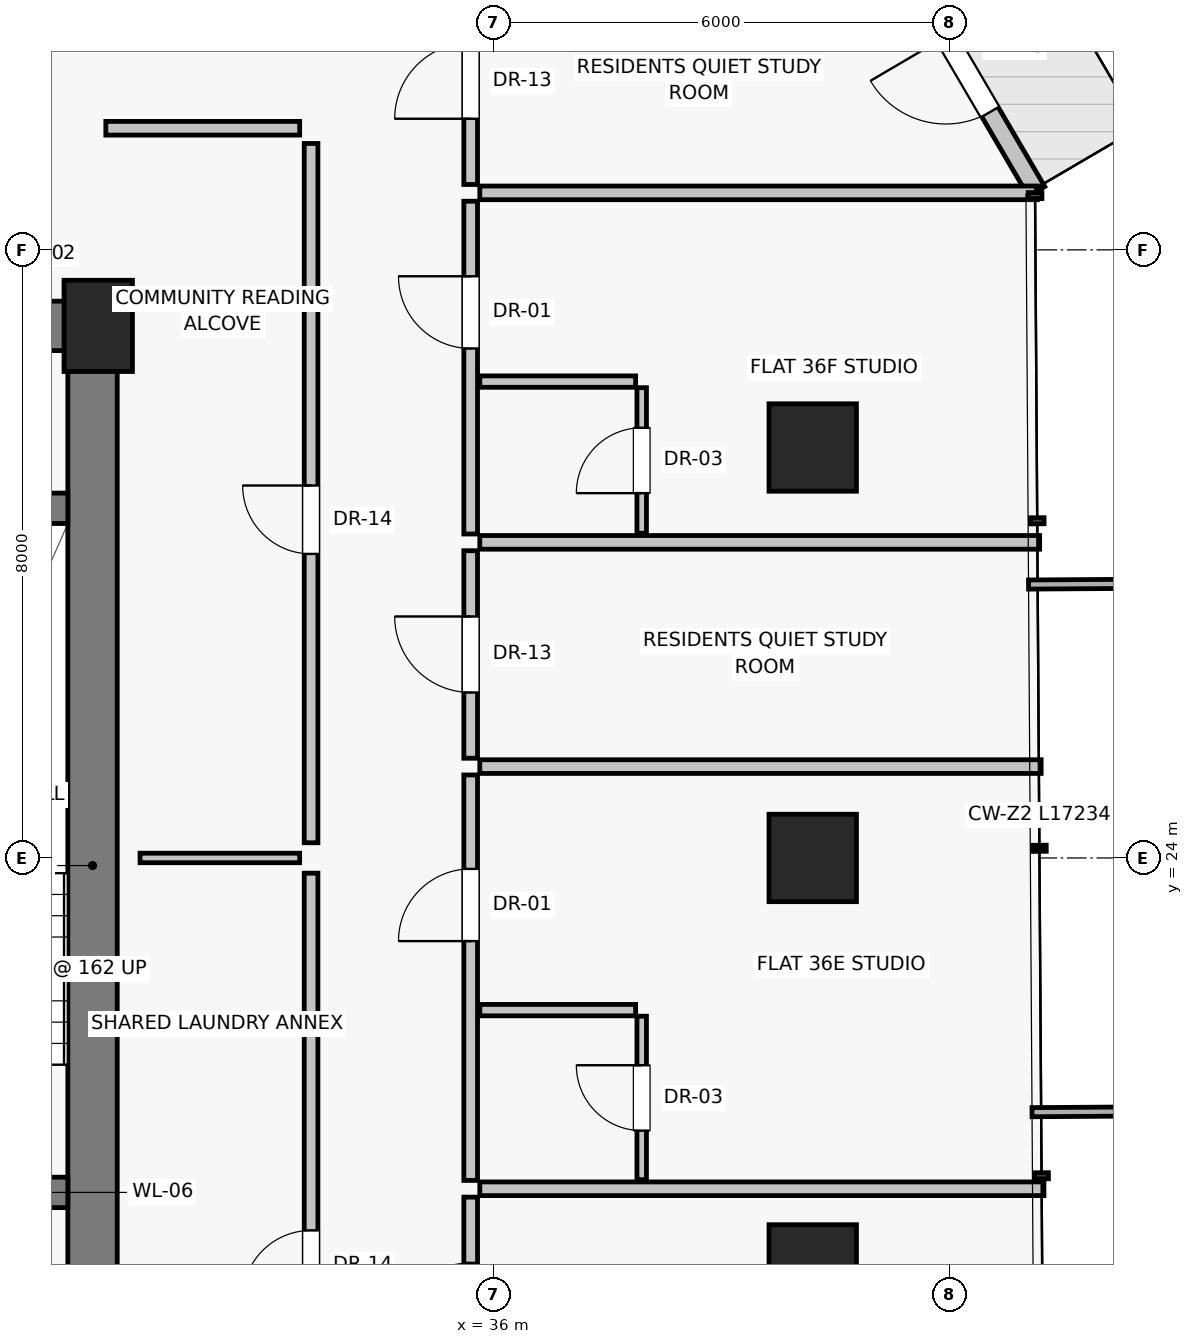
"""IFC4 building model, lengths in metres.
Left out: names, types, materials, properties, quantities, classifications, styles, units other than length and angle.
Written with IfcOpenShell. Run it as: python <this file> out.ifc"""

import sys

from ifc_helpers import new_model, si_unit, direction, frame, frame_2d, origin, origin_2d, place, context, subcontext, project, spatial, rectangle, extrude, source, transform, mapped, element, fill, save


model = new_model("IFC4")
c1 = context("Model", 3, precision=1e-05, world=origin(), true_north=direction((0.0, 1.0)))
c2 = subcontext(c1, "Body", "Model", "MODEL_VIEW")
j1 = project(units=[si_unit("LENGTHUNIT", "METRE"), si_unit("PLANEANGLEUNIT", "RADIAN")], contexts=[c1])
p1 = place(None, origin())
s1 = spatial("IfcSite", under=j1, at=p1, CompositionType="ELEMENT")
p2 = place(p1, origin())
s2 = spatial("IfcBuilding", under=s1, at=p2, CompositionType="ELEMENT")
p3 = place(p2, frame((0.0, 0.0, 129.5)))
s3 = spatial("IfcBuildingStorey", under=s2, at=p3, CompositionType="ELEMENT", Elevation=129.5)
p4 = place(p3, frame((30.8, 31.0, 0.0), z_axis=(0.0, 0.0, 1.0), x_axis=(1.0, 0.0, 0.0)))
e1 = element("IfcColumn", 1, at=p4, inside=s3, PredefinedType="PILASTER", context=c2, shape_type="SweptSolid", body=[
    extrude(rectangle(XDim=0.9, YDim=1.2, at=origin_2d()), origin(), (0.0, 0.0, 1.0), 3.25),
])
for number, where, z_axis, x_axis in (
    (2, (40.2, 18.6, 0.0), (0.0, 0.0, 1.0), (1.0, 0.0, 0.0)),
    (3, (40.2, 24.0, 0.0), (0.0, 0.0, 1.0), (1.0, 0.0, 0.0)),
    (4, (40.2, 29.4, 0.0), (0.0, 0.0, 1.0), (1.0, 0.0, 0.0)),
):
    element("IfcColumn", number, at=place(p3, frame(where, z_axis=z_axis, x_axis=x_axis)), inside=s3, PredefinedType="COLUMN", context=c2, shape_type="SweptSolid", body=[
        extrude(rectangle(XDim=1.15, YDim=1.15, at=origin_2d()), origin(), (0.0, 0.0, 1.0), 3.25),
    ])
p5 = place(p3, frame((43.145, 32.77, 0.0), z_axis=(0.0, 0.0, 1.0), x_axis=(-0.505741701413, 0.862684954924, 0.0)))
e5 = element("IfcWall", 5, at=p5, inside=s3, PredefinedType="SOLIDWALL", context=c2, shape_type="SweptSolid", body=[
    extrude(rectangle(XDim=4.233, YDim=0.25, at=frame_2d((2.117, 0.0))), origin(), (0.0, 0.0, 1.0), 3.0),
])
p6 = place(p5, frame((1.21, 0.0, 0.0)))
e6 = element("IfcOpeningElement", 6, at=p6, cuts=e5, PredefinedType="OPENING", context=c2, shape_type="SweptSolid", body=[
    extrude(rectangle(XDim=1.15, YDim=2.25, at=frame_2d((0.575, 1.125))), frame((0.0, 0.135, 0.0), z_axis=(0.0, -1.0, 0.0), x_axis=(1.0, 0.0, 0.0)), (0.0, 0.0, 1.0), 0.27),
])
p7 = place(p3, frame((30.725, 16.8, 0.0), z_axis=(0.0, 0.0, 1.0), x_axis=(0.0, 1.0, 0.0)))
e7 = element("IfcWall", 7, at=p7, inside=s3, PredefinedType="SHEAR", context=c2, shape_type="SweptSolid", body=[
    extrude(rectangle(XDim=14.2, YDim=0.65, at=frame_2d((7.1, 0.0))), origin(), (0.0, 0.0, 1.0), 3.0),
])
p8 = place(p3, frame((27.0, 31.0, 0.0), z_axis=(0.0, 0.0, 1.0), x_axis=(1.0, 0.0, 0.0)))
e8 = element("IfcWall", 8, at=p8, inside=s3, PredefinedType="SHEAR", context=c2, shape_type="SweptSolid", body=[
    extrude(rectangle(XDim=3.8, YDim=0.65, at=frame_2d((1.9, 0.0))), origin(), (0.0, 0.0, 1.0), 3.0),
])
p9 = place(p8, frame((1.15, 0.0, 0.0)))
e9 = element("IfcOpeningElement", 9, at=p9, cuts=e8, PredefinedType="OPENING", context=c2, shape_type="SweptSolid", body=[
    extrude(rectangle(XDim=1.0, YDim=2.01, at=frame_2d((0.5, 1.005))), frame((0.0, 0.335, 0.0), z_axis=(0.0, -1.0, 0.0), x_axis=(1.0, 0.0, 0.0)), (0.0, 0.0, 1.0), 0.67),
])
p10 = place(p3, frame((27.0, 19.6, 0.0), z_axis=(0.0, 0.0, 1.0), x_axis=(1.0, 0.0, 0.0)))
e10 = element("IfcWall", 10, at=p10, inside=s3, PredefinedType="SHEAR", context=c2, shape_type="SweptSolid", body=[
    extrude(rectangle(XDim=3.4, YDim=0.4, at=frame_2d((1.7, 0.0))), origin(), (0.0, 0.0, 1.0), 3.0),
])
p11 = place(p10, frame((1.05, 0.0, 0.0)))
e11 = element("IfcOpeningElement", 11, at=p11, cuts=e10, PredefinedType="OPENING", context=c2, shape_type="SweptSolid", body=[
    extrude(rectangle(XDim=1.1, YDim=2.03, at=frame_2d((0.55, 1.015))), frame((0.0, 0.21, 0.0), z_axis=(0.0, -1.0, 0.0), x_axis=(1.0, 0.0, 0.0)), (0.0, 0.0, 1.0), 0.42),
])
p12 = place(p3, frame((27.0, 28.6, 0.0), z_axis=(0.0, 0.0, 1.0), x_axis=(1.0, 0.0, 0.0)))
e12 = element("IfcWall", 12, at=p12, inside=s3, PredefinedType="SHEAR", context=c2, shape_type="SweptSolid", body=[
    extrude(rectangle(XDim=3.4, YDim=0.4, at=frame_2d((1.7, 0.0))), origin(), (0.0, 0.0, 1.0), 3.0),
])
p13 = place(p3, frame((33.6, 14.4, 0.0), z_axis=(0.0, 0.0, 1.0), x_axis=(0.0, 1.0, 0.0)))
e13 = element("IfcWall", 13, at=p13, inside=s3, PredefinedType="PARTITIONING", context=c2, shape_type="SweptSolid", body=[
    extrude(rectangle(XDim=9.4, YDim=0.18, at=frame_2d((4.7, 0.0))), origin(), (0.0, 0.0, 1.0), 3.0),
])
p14 = place(p13, frame((3.8, 0.0, 0.0)))
e14 = element("IfcOpeningElement", 14, at=p14, cuts=e13, PredefinedType="OPENING", context=c2, shape_type="SweptSolid", body=[
    extrude(rectangle(XDim=0.9, YDim=2.01, at=frame_2d((0.45, 1.005))), frame((0.0, 0.1, 0.0), z_axis=(0.0, -1.0, 0.0), x_axis=(1.0, 0.0, 0.0)), (0.0, 0.0, 1.0), 0.2),
])
p15 = place(p3, frame((33.6, 24.2, 0.0), z_axis=(0.0, 0.0, 1.0), x_axis=(0.0, 1.0, 0.0)))
e15 = element("IfcWall", 15, at=p15, inside=s3, PredefinedType="PARTITIONING", context=c2, shape_type="SweptSolid", body=[
    extrude(rectangle(XDim=9.2, YDim=0.18, at=frame_2d((4.6, 0.0))), origin(), (0.0, 0.0, 1.0), 3.0),
])
p16 = place(p15, frame((3.8, 0.0, 0.0)))
e16 = element("IfcOpeningElement", 16, at=p16, cuts=e15, PredefinedType="OPENING", context=c2, shape_type="SweptSolid", body=[
    extrude(rectangle(XDim=0.9, YDim=2.01, at=frame_2d((0.45, 1.005))), frame((0.0, 0.1, 0.0), z_axis=(0.0, -1.0, 0.0), x_axis=(1.0, 0.0, 0.0)), (0.0, 0.0, 1.0), 0.2),
])
p17 = place(p3, frame((31.35, 24.0, 0.0), z_axis=(0.0, 0.0, 1.0), x_axis=(1.0, 0.0, 0.0)))
e17 = element("IfcWall", 17, at=p17, inside=s3, PredefinedType="PARTITIONING", context=c2, shape_type="SweptSolid", body=[
    extrude(rectangle(XDim=2.1, YDim=0.125, at=frame_2d((1.05, 0.0))), origin(), (0.0, 0.0, 1.0), 3.0),
])
p18 = place(p3, frame((30.9, 33.6, 0.0), z_axis=(0.0, 0.0, 1.0), x_axis=(1.0, 0.0, 0.0)))
e18 = element("IfcWall", 18, at=p18, inside=s3, PredefinedType="PARTITIONING", context=c2, shape_type="SweptSolid", body=[
    extrude(rectangle(XDim=2.55, YDim=0.18, at=frame_2d((1.275, 0.0))), origin(), (0.0, 0.0, 1.0), 3.0),
])
p19 = place(p3, frame((35.7, 16.808, 0.0), z_axis=(0.0, 0.0, 1.0), x_axis=(0.0, 1.0, 0.0)))
e19 = element("IfcWall", 19, at=p19, inside=s3, PredefinedType="PARTITIONING", context=c2, shape_type="SweptSolid", body=[
    extrude(rectangle(XDim=2.73, YDim=0.18, at=frame_2d((1.365, 0.0))), origin(), (0.0, 0.0, 1.0), 2.58),
])
p20 = place(p19, frame((0.865, 0.0, 0.0)))
e20 = element("IfcOpeningElement", 20, at=p20, cuts=e19, PredefinedType="OPENING", context=c2, shape_type="SweptSolid", body=[
    extrude(rectangle(XDim=1.0, YDim=2.01, at=frame_2d((0.5, 1.005))), frame((0.0, 0.1, 0.0), z_axis=(0.0, -1.0, 0.0), x_axis=(1.0, 0.0, 0.0)), (0.0, 0.0, 1.0), 0.2),
])
p21 = place(p3, frame((35.82, 19.648, 0.0), z_axis=(0.0, 0.0, 1.0), x_axis=(1.0, 0.0, 0.0)))
e21 = element("IfcWall", 21, at=p21, inside=s3, PredefinedType="PARTITIONING", context=c2, shape_type="SweptSolid", body=[
    extrude(rectangle(XDim=7.422, YDim=0.18, at=frame_2d((3.711, 0.0))), origin(), (0.0, 0.0, 1.0), 3.0),
])
p22 = place(p3, frame((35.7, 25.312, 0.0), z_axis=(0.0, 0.0, 1.0), x_axis=(0.0, 1.0, 0.0)))
e22 = element("IfcWall", 22, at=p22, inside=s3, PredefinedType="PARTITIONING", context=c2, shape_type="SweptSolid", body=[
    extrude(rectangle(XDim=2.73, YDim=0.18, at=frame_2d((1.365, 0.0))), origin(), (0.0, 0.0, 1.0), 2.58),
])
p23 = place(p22, frame((0.865, 0.0, 0.0)))
e23 = element("IfcOpeningElement", 23, at=p23, cuts=e22, PredefinedType="OPENING", context=c2, shape_type="SweptSolid", body=[
    extrude(rectangle(XDim=1.0, YDim=2.01, at=frame_2d((0.5, 1.005))), frame((0.0, 0.1, 0.0), z_axis=(0.0, -1.0, 0.0), x_axis=(1.0, 0.0, 0.0)), (0.0, 0.0, 1.0), 0.2),
])
p24 = place(p3, frame((35.82, 25.202, 0.0), z_axis=(0.0, 0.0, 1.0), x_axis=(1.0, 0.0, 0.0)))
e24 = element("IfcWall", 24, at=p24, inside=s3, PredefinedType="PARTITIONING", context=c2, shape_type="SweptSolid", body=[
    extrude(rectangle(XDim=7.385, YDim=0.18, at=frame_2d((3.692, 0.0))), origin(), (0.0, 0.0, 1.0), 3.0),
])
p25 = place(p3, frame((35.7, 19.758, 0.0), z_axis=(0.0, 0.0, 1.0), x_axis=(0.0, 1.0, 0.0)))
e25 = element("IfcWall", 25, at=p25, inside=s3, PredefinedType="PARTITIONING", context=c2, shape_type="SweptSolid", body=[
    extrude(rectangle(XDim=5.334, YDim=0.18, at=frame_2d((2.667, 0.0))), origin(), (0.0, 0.0, 1.0), 2.58),
])
p26 = place(p25, frame((3.148, 0.0, 0.0)))
e26 = element("IfcOpeningElement", 26, at=p26, cuts=e25, PredefinedType="OPENING", context=c2, shape_type="SweptSolid", body=[
    extrude(rectangle(XDim=0.95, YDim=2.02, at=frame_2d((0.475, 1.01))), frame((0.0, 0.1, 0.0), z_axis=(0.0, -1.0, 0.0), x_axis=(1.0, 0.0, 0.0)), (0.0, 0.0, 1.0), 0.2),
])
p27 = place(p3, frame((35.82, 21.998, 0.0), z_axis=(0.0, 0.0, 1.0), x_axis=(1.0, 0.0, 0.0)))
e27 = element("IfcWall", 27, at=p27, inside=s3, PredefinedType="PARTITIONING", context=c2, shape_type="SweptSolid", body=[
    extrude(rectangle(XDim=2.05, YDim=0.15, at=frame_2d((1.025, 0.0))), origin(), (0.0, 0.0, 1.0), 3.0),
])
p28 = place(p3, frame((37.95, 19.768, 0.0), z_axis=(0.0, 0.0, 1.0), x_axis=(0.0, 1.0, 0.0)))
e28 = element("IfcWall", 28, at=p28, inside=s3, PredefinedType="PARTITIONING", context=c2, shape_type="SweptSolid", body=[
    extrude(rectangle(XDim=2.15, YDim=0.125, at=frame_2d((1.075, 0.0))), origin(), (0.0, 0.0, 1.0), 3.0),
])
p29 = place(p28, frame((0.645, 0.0, 0.0)))
e29 = element("IfcOpeningElement", 29, at=p29, cuts=e28, PredefinedType="OPENING", context=c2, shape_type="SweptSolid", body=[
    extrude(rectangle(XDim=0.86, YDim=2.01, at=frame_2d((0.43, 1.005))), frame((0.0, 0.073, 0.0), z_axis=(0.0, -1.0, 0.0), x_axis=(1.0, 0.0, 0.0)), (0.0, 0.0, 1.0), 0.145),
])
p30 = place(p3, frame((35.82, 28.152, 0.0), z_axis=(0.0, 0.0, 1.0), x_axis=(1.0, 0.0, 0.0)))
e30 = element("IfcWall", 30, at=p30, inside=s3, PredefinedType="PARTITIONING", context=c2, shape_type="SweptSolid", body=[
    extrude(rectangle(XDim=7.365, YDim=0.18, at=frame_2d((3.683, 0.0))), origin(), (0.0, 0.0, 1.0), 3.0),
])
p31 = place(p3, frame((35.7, 32.86, 0.0), z_axis=(0.0, 0.0, 1.0), x_axis=(0.0, 1.0, 0.0)))
e31 = element("IfcWall", 31, at=p31, inside=s3, PredefinedType="PARTITIONING", context=c2, shape_type="SweptSolid", body=[
    extrude(rectangle(XDim=2.73, YDim=0.18, at=frame_2d((1.365, 0.0))), origin(), (0.0, 0.0, 1.0), 3.0),
])
p32 = place(p31, frame((0.865, 0.0, 0.0)))
e32 = element("IfcOpeningElement", 32, at=p32, cuts=e31, PredefinedType="OPENING", context=c2, shape_type="SweptSolid", body=[
    extrude(rectangle(XDim=1.0, YDim=2.01, at=frame_2d((0.5, 1.005))), frame((0.0, 0.1, 0.0), z_axis=(0.0, -1.0, 0.0), x_axis=(1.0, 0.0, 0.0)), (0.0, 0.0, 1.0), 0.2),
])
p33 = place(p3, frame((35.82, 32.75, 0.0), z_axis=(0.0, 0.0, 1.0), x_axis=(1.0, 0.0, 0.0)))
e33 = element("IfcWall", 33, at=p33, inside=s3, PredefinedType="PARTITIONING", context=c2, shape_type="SweptSolid", body=[
    extrude(rectangle(XDim=7.335, YDim=0.18, at=frame_2d((3.667, 0.0))), origin(), (0.0, 0.0, 1.0), 3.0),
])
p34 = place(p3, frame((35.7, 28.262, 0.0), z_axis=(0.0, 0.0, 1.0), x_axis=(0.0, 1.0, 0.0)))
e34 = element("IfcWall", 34, at=p34, inside=s3, PredefinedType="PARTITIONING", context=c2, shape_type="SweptSolid", body=[
    extrude(rectangle(XDim=4.378, YDim=0.18, at=frame_2d((2.189, 0.0))), origin(), (0.0, 0.0, 1.0), 2.58),
])
p35 = place(p34, frame((2.441, 0.0, 0.0)))
e35 = element("IfcOpeningElement", 35, at=p35, cuts=e34, PredefinedType="OPENING", context=c2, shape_type="SweptSolid", body=[
    extrude(rectangle(XDim=0.95, YDim=2.02, at=frame_2d((0.475, 1.01))), frame((0.0, 0.1, 0.0), z_axis=(0.0, -1.0, 0.0), x_axis=(1.0, 0.0, 0.0)), (0.0, 0.0, 1.0), 0.2),
])
p36 = place(p3, frame((35.82, 30.267, 0.0), z_axis=(0.0, 0.0, 1.0), x_axis=(1.0, 0.0, 0.0)))
e36 = element("IfcWall", 36, at=p36, inside=s3, PredefinedType="PARTITIONING", context=c2, shape_type="SweptSolid", body=[
    extrude(rectangle(XDim=2.05, YDim=0.15, at=frame_2d((1.025, 0.0))), origin(), (0.0, 0.0, 1.0), 2.378),
])
p37 = place(p3, frame((37.95, 28.272, 0.0), z_axis=(0.0, 0.0, 1.0), x_axis=(0.0, 1.0, 0.0)))
e37 = element("IfcWall", 37, at=p37, inside=s3, PredefinedType="PARTITIONING", context=c2, shape_type="SweptSolid", body=[
    extrude(rectangle(XDim=1.915, YDim=0.125, at=frame_2d((0.958, 0.0))), origin(), (0.0, 0.0, 1.0), 3.0),
])
p38 = place(p37, frame((0.528, 0.0, 0.0)))
e38 = element("IfcOpeningElement", 38, at=p38, cuts=e37, PredefinedType="OPENING", context=c2, shape_type="SweptSolid", body=[
    extrude(rectangle(XDim=0.86, YDim=2.01, at=frame_2d((0.43, 1.005))), frame((0.0, 0.073, 0.0), z_axis=(0.0, -1.0, 0.0), x_axis=(1.0, 0.0, 0.0)), (0.0, 0.0, 1.0), 0.145),
])
m1 = source(origin(), c2, "Body", "SweptSolid", [
    extrude(rectangle(XDim=1.15, YDim=2.25, at=frame_2d((0.575, 1.125))), frame((0.0, 0.025, 0.0), z_axis=(0.0, -1.0, 0.0), x_axis=(1.0, 0.0, 0.0)), (0.0, 0.0, 1.0), 0.05),
])
p39 = place(p6, frame((1.15, 0.0, 0.0), z_axis=(0.0, 0.0, 1.0), x_axis=(-1.0, 0.0, 0.0)))
e39 = element("IfcDoor", 39, at=p39, inside=s3, OperationType="SINGLE_SWING_RIGHT", PredefinedType="DOOR", context=c2, shape_type="MappedRepresentation", body=[
    mapped(m1, transform((0.0, 0.0, 0.0), scale=1.0)),
])
fill(e6, e39)
m2 = source(origin(), c2, "Body", "SweptSolid", [
    extrude(rectangle(XDim=0.9, YDim=2.01, at=frame_2d((0.45, 1.005))), frame((0.0, 0.025, 0.0), z_axis=(0.0, -1.0, 0.0), x_axis=(1.0, 0.0, 0.0)), (0.0, 0.0, 1.0), 0.05),
])
p40 = place(p14, origin())
e40 = element("IfcDoor", 40, at=p40, inside=s3, OperationType="SINGLE_SWING_LEFT", PredefinedType="DOOR", context=c2, shape_type="MappedRepresentation", body=[
    mapped(m2, transform((0.0, 0.0, 0.0), scale=1.0)),
])
fill(e14, e40)
p41 = place(p16, origin())
e41 = element("IfcDoor", 41, at=p41, inside=s3, OperationType="SINGLE_SWING_RIGHT", PredefinedType="DOOR", context=c2, shape_type="MappedRepresentation", body=[
    mapped(m2, transform((0.0, 0.0, 0.0), scale=1.0)),
])
fill(e16, e41)
m3 = source(origin(), c2, "Body", "SweptSolid", [
    extrude(rectangle(XDim=1.0, YDim=2.01, at=frame_2d((0.5, 1.005))), frame((0.0, 0.025, 0.0), z_axis=(0.0, -1.0, 0.0), x_axis=(1.0, 0.0, 0.0)), (0.0, 0.0, 1.0), 0.05),
])
p42 = place(p20, origin())
e42 = element("IfcDoor", 42, at=p42, inside=s3, OperationType="SINGLE_SWING_LEFT", PredefinedType="DOOR", context=c2, shape_type="MappedRepresentation", body=[
    mapped(m3, transform((0.0, 0.0, 0.0), scale=1.0)),
])
fill(e20, e42)
p43 = place(p23, origin())
e43 = element("IfcDoor", 43, at=p43, inside=s3, OperationType="SINGLE_SWING_RIGHT", PredefinedType="DOOR", context=c2, shape_type="MappedRepresentation", body=[
    mapped(m3, transform((0.0, 0.0, 0.0), scale=1.0)),
])
fill(e23, e43)
m4 = source(origin(), c2, "Body", "SweptSolid", [
    extrude(rectangle(XDim=0.95, YDim=2.02, at=frame_2d((0.475, 1.01))), frame((0.0, 0.025, 0.0), z_axis=(0.0, -1.0, 0.0), x_axis=(1.0, 0.0, 0.0)), (0.0, 0.0, 1.0), 0.05),
])
p44 = place(p26, origin())
e44 = element("IfcDoor", 44, at=p44, inside=s3, OperationType="SINGLE_SWING_LEFT", PredefinedType="DOOR", context=c2, shape_type="MappedRepresentation", body=[
    mapped(m4, transform((0.0, 0.0, 0.0), scale=1.0)),
])
fill(e26, e44)
m5 = source(origin(), c2, "Body", "SweptSolid", [
    extrude(rectangle(XDim=0.86, YDim=2.01, at=frame_2d((0.43, 1.005))), frame((0.0, 0.025, 0.0), z_axis=(0.0, -1.0, 0.0), x_axis=(1.0, 0.0, 0.0)), (0.0, 0.0, 1.0), 0.05),
])
p45 = place(p29, origin())
e45 = element("IfcDoor", 45, at=p45, inside=s3, OperationType="SINGLE_SWING_RIGHT", PredefinedType="DOOR", context=c2, shape_type="MappedRepresentation", body=[
    mapped(m5, transform((0.0, 0.0, 0.0), scale=1.0)),
])
fill(e29, e45)
p46 = place(p32, origin())
e46 = element("IfcDoor", 46, at=p46, inside=s3, OperationType="SINGLE_SWING_LEFT", PredefinedType="DOOR", context=c2, shape_type="MappedRepresentation", body=[
    mapped(m3, transform((0.0, 0.0, 0.0), scale=1.0)),
])
fill(e32, e46)
p47 = place(p35, origin())
e47 = element("IfcDoor", 47, at=p47, inside=s3, OperationType="SINGLE_SWING_RIGHT", PredefinedType="DOOR", context=c2, shape_type="MappedRepresentation", body=[
    mapped(m4, transform((0.0, 0.0, 0.0), scale=1.0)),
])
fill(e35, e47)
p48 = place(p38, origin())
e48 = element("IfcDoor", 48, at=p48, inside=s3, OperationType="SINGLE_SWING_LEFT", PredefinedType="DOOR", context=c2, shape_type="MappedRepresentation", body=[
    mapped(m5, transform((0.0, 0.0, 0.0), scale=1.0)),
])
fill(e38, e48)
save(model, sys.argv[1])
